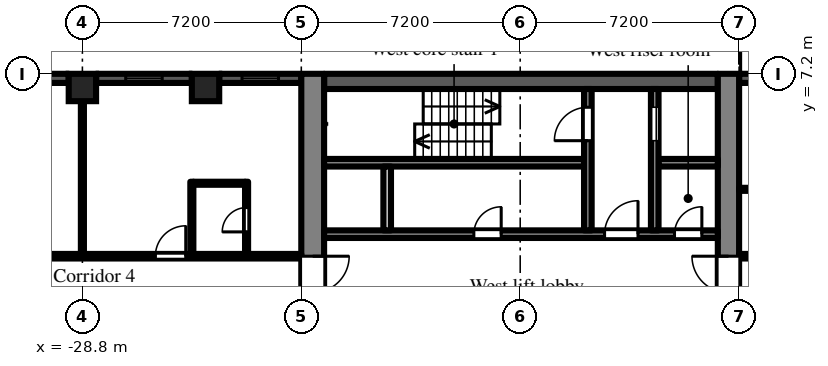
"""IFC4 building model, lengths in metres.
Left out: names, types, materials, properties, quantities, classifications, styles, units other than length and angle.
Written with IfcOpenShell. Run it as: python <this file> out.ifc"""

import sys

from ifc_helpers import new_model, si_unit, direction, frame, frame_2d, origin, origin_2d, place, context, subcontext, project, spatial, rectangle, extrude, element, fill, save


model = new_model("IFC4")
c1 = context("Model", 3, precision=1e-05, world=origin(), true_north=direction((0.0, 1.0)))
c2 = subcontext(c1, "Body", "Model", "MODEL_VIEW")
j1 = project(units=[si_unit("LENGTHUNIT", "METRE"), si_unit("PLANEANGLEUNIT", "RADIAN")], contexts=[c1])
p1 = place(None, origin())
s1 = spatial("IfcSite", under=j1, at=p1, CompositionType="ELEMENT")
p2 = place(p1, origin())
s2 = spatial("IfcBuilding", under=s1, at=p2, CompositionType="ELEMENT")
p3 = place(p2, frame((0.0, 0.0, 35.7)))
s3 = spatial("IfcBuildingStorey", under=s2, at=p3, CompositionType="ELEMENT", Elevation=35.7)
for number, where, z_axis, x_axis in (
    (1, (-28.8, 6.75, 0.0), (0.0, 0.0, 1.0), (1.0, 0.0, 0.0)),
    (2, (-24.75, 6.75, 0.0), (0.0, 0.0, 1.0), (1.0, 0.0, 0.0)),
):
    element("IfcColumn", number, at=place(p3, frame(where, z_axis=z_axis, x_axis=x_axis)), inside=s3, PredefinedType="COLUMN", context=c2, shape_type="SweptSolid", body=[
        extrude(rectangle(XDim=0.9, YDim=0.9, at=origin_2d()), origin(), (0.0, 0.0, 1.0), 3.0),
    ])
p4 = place(p3, frame((-4.2, 7.05, 0.0), z_axis=(0.0, 0.0, 1.0), x_axis=(-1.0, 0.0, 0.0)))
e3 = element("IfcWall", 3, at=p4, inside=s3, PredefinedType="SOLIDWALL", context=c2, shape_type="SweptSolid", body=[
    extrude(rectangle(XDim=3.0, YDim=0.3, at=frame_2d((1.5, 0.0))), origin(), (0.0, 0.0, 1.0), 2.1),
])
p5 = place(p3, frame((-21.6, 7.05, 0.0), z_axis=(0.0, 0.0, 1.0), x_axis=(-1.0, 0.0, 0.0)))
e4 = element("IfcWall", 4, at=p5, inside=s3, PredefinedType="SOLIDWALL", context=c2, shape_type="SweptSolid", body=[
    extrude(rectangle(XDim=2.7, YDim=0.3, at=frame_2d((1.35, 0.0))), origin(), (0.0, 0.0, 1.0), 2.1),
])
p6 = place(p5, frame((0.75, 0.0, 0.2)))
e5 = element("IfcOpeningElement", 5, at=p6, cuts=e4, PredefinedType="OPENING", context=c2, shape_type="SweptSolid", body=[
    extrude(rectangle(XDim=1.2, YDim=1.85, at=frame_2d((0.6, 0.925))), frame((0.0, 0.16, 0.0), z_axis=(0.0, -1.0, 0.0), x_axis=(1.0, 0.0, 0.0)), (0.0, 0.0, 1.0), 0.32),
])
p7 = place(p3, frame((-25.2, 7.05, 0.0), z_axis=(0.0, 0.0, 1.0), x_axis=(-1.0, 0.0, 0.0)))
e6 = element("IfcWall", 6, at=p7, inside=s3, PredefinedType="SOLIDWALL", context=c2, shape_type="SweptSolid", body=[
    extrude(rectangle(XDim=3.15, YDim=0.3, at=frame_2d((1.575, 0.0))), origin(), (0.0, 0.0, 1.0), 2.1),
])
p8 = place(p7, frame((0.975, 0.0, 0.2)))
e7 = element("IfcOpeningElement", 7, at=p8, cuts=e6, PredefinedType="OPENING", context=c2, shape_type="SweptSolid", body=[
    extrude(rectangle(XDim=1.2, YDim=1.85, at=frame_2d((0.6, 0.925))), frame((0.0, 0.16, 0.0), z_axis=(0.0, -1.0, 0.0), x_axis=(1.0, 0.0, 0.0)), (0.0, 0.0, 1.0), 0.32),
])
p9 = place(p3, frame((-29.25, 7.05, 0.0), z_axis=(0.0, 0.0, 1.0), x_axis=(-1.0, 0.0, 0.0)))
e8 = element("IfcWall", 8, at=p9, inside=s3, PredefinedType="SOLIDWALL", context=c2, shape_type="SweptSolid", body=[
    extrude(rectangle(XDim=6.3, YDim=0.3, at=frame_2d((3.15, 0.0))), origin(), (0.0, 0.0, 1.0), 2.1),
])
p10 = place(p9, frame((0.975, 0.0, 0.2)))
e9 = element("IfcOpeningElement", 9, at=p10, cuts=e8, PredefinedType="OPENING", context=c2, shape_type="SweptSolid", body=[
    extrude(rectangle(XDim=1.2, YDim=1.85, at=frame_2d((0.6, 0.925))), frame((0.0, 0.16, 0.0), z_axis=(0.0, -1.0, 0.0), x_axis=(1.0, 0.0, 0.0)), (0.0, 0.0, 1.0), 0.32),
])
p11 = place(p3, frame((-7.55, -7.2, 0.0), z_axis=(0.0, 0.0, 1.0), x_axis=(0.0, 1.0, 0.0)))
e10 = element("IfcWall", 10, at=p11, inside=s3, PredefinedType="SHEAR", context=c2, shape_type="SweptSolid", body=[
    extrude(rectangle(XDim=14.4, YDim=0.7, at=frame_2d((7.2, 0.0))), origin(), (0.0, 0.0, 1.0), 2.575),
])
p12 = place(p11, frame((6.0, 0.0, 0.0)))
e11 = element("IfcOpeningElement", 11, at=p12, cuts=e10, PredefinedType="OPENING", context=c2, shape_type="SweptSolid", body=[
    extrude(rectangle(XDim=2.4, YDim=2.2, at=frame_2d((1.2, 1.1))), frame((0.0, 0.36, 0.0), z_axis=(0.0, -1.0, 0.0), x_axis=(1.0, 0.0, 0.0)), (0.0, 0.0, 1.0), 0.72),
])
p13 = place(p3, frame((-21.225, -7.2, 0.0), z_axis=(0.0, 0.0, 1.0), x_axis=(0.0, 1.0, 0.0)))
e12 = element("IfcWall", 12, at=p13, inside=s3, PredefinedType="SHEAR", context=c2, shape_type="SweptSolid", body=[
    extrude(rectangle(XDim=14.4, YDim=0.75, at=frame_2d((7.2, 0.0))), origin(), (0.0, 0.0, 1.0), 2.575),
])
p14 = place(p13, frame((6.0, 0.0, 0.0)))
e13 = element("IfcOpeningElement", 13, at=p14, cuts=e12, PredefinedType="OPENING", context=c2, shape_type="SweptSolid", body=[
    extrude(rectangle(XDim=2.4, YDim=2.2, at=frame_2d((1.2, 1.1))), frame((0.0, 0.385, 0.0), z_axis=(0.0, -1.0, 0.0), x_axis=(1.0, 0.0, 0.0)), (0.0, 0.0, 1.0), 0.77),
])
p15 = place(p3, frame((-7.9, 6.95, 0.0), z_axis=(0.0, 0.0, 1.0), x_axis=(-1.0, 0.0, 0.0)))
e14 = element("IfcWall", 14, at=p15, inside=s3, PredefinedType="SHEAR", context=c2, shape_type="SweptSolid", body=[
    extrude(rectangle(XDim=12.95, YDim=0.5, at=frame_2d((6.475, 0.0))), origin(), (0.0, 0.0, 1.0), 2.575),
])
p16 = place(p3, frame((-7.9, 1.925, 0.0), z_axis=(0.0, 0.0, 1.0), x_axis=(-1.0, 0.0, 0.0)))
e15 = element("IfcWall", 15, at=p16, inside=s3, PredefinedType="SHEAR", context=c2, shape_type="SweptSolid", body=[
    extrude(rectangle(XDim=12.95, YDim=0.25, at=frame_2d((6.475, 0.0))), origin(), (0.0, 0.0, 1.0), 2.575),
])
p17 = place(p16, frame((0.525, 0.0, 0.0)))
e16 = element("IfcOpeningElement", 16, at=p17, cuts=e15, PredefinedType="OPENING", context=c2, shape_type="SweptSolid", body=[
    extrude(rectangle(XDim=0.9, YDim=2.1, at=frame_2d((0.45, 1.05))), frame((0.0, 0.135, 0.0), z_axis=(0.0, -1.0, 0.0), x_axis=(1.0, 0.0, 0.0)), (0.0, 0.0, 1.0), 0.27),
])
p18 = place(p16, frame((2.625, 0.0, 0.0)))
e17 = element("IfcOpeningElement", 17, at=p18, cuts=e15, PredefinedType="OPENING", context=c2, shape_type="SweptSolid", body=[
    extrude(rectangle(XDim=1.1, YDim=2.1, at=frame_2d((0.55, 1.05))), frame((0.0, 0.135, 0.0), z_axis=(0.0, -1.0, 0.0), x_axis=(1.0, 0.0, 0.0)), (0.0, 0.0, 1.0), 0.27),
])
p19 = place(p16, frame((7.125, 0.0, 0.0)))
e18 = element("IfcOpeningElement", 18, at=p19, cuts=e15, PredefinedType="OPENING", context=c2, shape_type="SweptSolid", body=[
    extrude(rectangle(XDim=0.9, YDim=2.1, at=frame_2d((0.45, 1.05))), frame((0.0, 0.135, 0.0), z_axis=(0.0, -1.0, 0.0), x_axis=(1.0, 0.0, 0.0)), (0.0, 0.0, 1.0), 0.27),
])
p20 = place(p3, frame((-7.9, 4.275, 0.0), z_axis=(0.0, 0.0, 1.0), x_axis=(-1.0, 0.0, 0.0)))
e19 = element("IfcWall", 19, at=p20, inside=s3, PredefinedType="SHEAR", context=c2, shape_type="SweptSolid", body=[
    extrude(rectangle(XDim=1.95, YDim=0.25, at=frame_2d((0.975, 0.0))), origin(), (0.0, 0.0, 1.0), 2.575),
])
p21 = place(p3, frame((-12.3, 4.275, 0.0), z_axis=(0.0, 0.0, 1.0), x_axis=(-1.0, 0.0, 0.0)))
e20 = element("IfcWall", 20, at=p21, inside=s3, PredefinedType="SHEAR", context=c2, shape_type="SweptSolid", body=[
    extrude(rectangle(XDim=8.55, YDim=0.25, at=frame_2d((4.275, 0.0))), origin(), (0.0, 0.0, 1.0), 2.575),
])
p22 = place(p3, frame((-9.975, 2.05, 0.0), z_axis=(0.0, 0.0, 1.0), x_axis=(0.0, 1.0, 0.0)))
e21 = element("IfcWall", 21, at=p22, inside=s3, PredefinedType="SHEAR", context=c2, shape_type="SweptSolid", body=[
    extrude(rectangle(XDim=4.65, YDim=0.25, at=frame_2d((2.325, 0.0))), origin(), (0.0, 0.0, 1.0), 2.575),
])
p23 = place(p22, frame((2.95, 0.0, 0.0)))
e22 = element("IfcOpeningElement", 22, at=p23, cuts=e21, PredefinedType="OPENING", context=c2, shape_type="SweptSolid", body=[
    extrude(rectangle(XDim=1.1, YDim=2.1, at=frame_2d((0.55, 1.05))), frame((0.0, 0.135, 0.0), z_axis=(0.0, -1.0, 0.0), x_axis=(1.0, 0.0, 0.0)), (0.0, 0.0, 1.0), 0.27),
])
p24 = place(p3, frame((-12.175, 2.05, 0.0), z_axis=(0.0, 0.0, 1.0), x_axis=(0.0, 1.0, 0.0)))
e23 = element("IfcWall", 23, at=p24, inside=s3, PredefinedType="SHEAR", context=c2, shape_type="SweptSolid", body=[
    extrude(rectangle(XDim=4.65, YDim=0.25, at=frame_2d((2.325, 0.0))), origin(), (0.0, 0.0, 1.0), 2.575),
])
p25 = place(p24, frame((2.95, 0.0, 0.0)))
e24 = element("IfcOpeningElement", 24, at=p25, cuts=e23, PredefinedType="OPENING", context=c2, shape_type="SweptSolid", body=[
    extrude(rectangle(XDim=1.1, YDim=2.1, at=frame_2d((0.55, 1.05))), frame((0.0, 0.135, 0.0), z_axis=(0.0, -1.0, 0.0), x_axis=(1.0, 0.0, 0.0)), (0.0, 0.0, 1.0), 0.27),
])
p26 = place(p3, frame((-18.775, 2.05, 0.0), z_axis=(0.0, 0.0, 1.0), x_axis=(0.0, 1.0, 0.0)))
e25 = element("IfcWall", 25, at=p26, inside=s3, PredefinedType="PARTITIONING", context=c2, shape_type="SweptSolid", body=[
    extrude(rectangle(XDim=2.1, YDim=0.25, at=frame_2d((1.05, 0.0))), origin(), (0.0, 0.0, 1.0), 2.575),
])
p27 = place(p3, frame((-36.5, 1.2, 0.0), z_axis=(0.0, 0.0, 1.0), x_axis=(1.0, 0.0, 0.0)))
e26 = element("IfcWall", 26, at=p27, inside=s3, PredefinedType="PARTITIONING", context=c2, shape_type="SweptSolid", body=[
    extrude(rectangle(XDim=14.9, YDim=0.15, at=frame_2d((7.45, 0.0))), origin(), (0.0, 0.0, 1.0), 2.575),
])
p28 = place(p27, frame((10.1, 0.0, 0.0)))
e27 = element("IfcOpeningElement", 27, at=p28, cuts=e26, PredefinedType="OPENING", context=c2, shape_type="SweptSolid", body=[
    extrude(rectangle(XDim=1.0, YDim=2.1, at=frame_2d((0.5, 1.05))), frame((0.0, 0.085, 0.0), z_axis=(0.0, -1.0, 0.0), x_axis=(1.0, 0.0, 0.0)), (0.0, 0.0, 1.0), 0.17),
])
p29 = place(p27, frame((5.45, 0.0, 0.0)))
e28 = element("IfcOpeningElement", 28, at=p29, cuts=e26, PredefinedType="OPENING", context=c2, shape_type="SweptSolid", body=[
    extrude(rectangle(XDim=0.9, YDim=2.1, at=frame_2d((0.45, 1.05))), frame((0.0, 0.085, 0.0), z_axis=(0.0, -1.0, 0.0), x_axis=(1.0, 0.0, 0.0)), (0.0, 0.0, 1.0), 0.17),
])
p30 = place(p27, frame((1.15, 0.0, 0.0)))
e29 = element("IfcOpeningElement", 29, at=p30, cuts=e26, PredefinedType="OPENING", context=c2, shape_type="SweptSolid", body=[
    extrude(rectangle(XDim=1.8, YDim=2.1, at=frame_2d((0.9, 1.05))), frame((0.0, 0.085, 0.0), z_axis=(0.0, -1.0, 0.0), x_axis=(1.0, 0.0, 0.0)), (0.0, 0.0, 1.0), 0.17),
])
p31 = place(p3, frame((-28.8, 1.275, 0.0), z_axis=(0.0, 0.0, 1.0), x_axis=(0.0, 1.0, 0.0)))
e30 = element("IfcWall", 30, at=p31, inside=s3, PredefinedType="PARTITIONING", context=c2, shape_type="SweptSolid", body=[
    extrude(rectangle(XDim=5.625, YDim=0.1, at=frame_2d((2.812, 0.0))), origin(), (0.0, 0.0, 1.0), 2.575),
])
p32 = place(p3, frame((-25.2, 1.275, 0.0), z_axis=(0.0, 0.0, 1.0), x_axis=(0.0, 1.0, 0.0)))
e31 = element("IfcWall", 31, at=p32, inside=s3, PredefinedType="PARTITIONING", context=c2, shape_type="SweptSolid", body=[
    extrude(rectangle(XDim=2.375, YDim=0.1, at=frame_2d((1.188, 0.0))), origin(), (0.0, 0.0, 1.0), 2.575),
])
p33 = place(p3, frame((-25.15, 3.6, 0.0), z_axis=(0.0, 0.0, 1.0), x_axis=(1.0, 0.0, 0.0)))
e32 = element("IfcWall", 32, at=p33, inside=s3, PredefinedType="PARTITIONING", context=c2, shape_type="SweptSolid", body=[
    extrude(rectangle(XDim=1.7, YDim=0.1, at=frame_2d((0.85, 0.0))), origin(), (0.0, 0.0, 1.0), 2.575),
])
p34 = place(p3, frame((-23.4, 1.275, 0.0), z_axis=(0.0, 0.0, 1.0), x_axis=(0.0, 1.0, 0.0)))
e33 = element("IfcWall", 33, at=p34, inside=s3, PredefinedType="PARTITIONING", context=c2, shape_type="SweptSolid", body=[
    extrude(rectangle(XDim=2.375, YDim=0.1, at=frame_2d((1.188, 0.0))), origin(), (0.0, 0.0, 1.0), 2.575),
])
p35 = place(p34, frame((0.725, 0.0, 0.0)))
e34 = element("IfcOpeningElement", 34, at=p35, cuts=e33, PredefinedType="OPENING", context=c2, shape_type="SweptSolid", body=[
    extrude(rectangle(XDim=0.8, YDim=2.1, at=frame_2d((0.4, 1.05))), frame((0.0, 0.06, 0.0), z_axis=(0.0, -1.0, 0.0), x_axis=(1.0, 0.0, 0.0)), (0.0, 0.0, 1.0), 0.12),
])
p36 = place(p3, frame((-7.2, 1.2, 0.0), z_axis=(0.0, 0.0, 1.0), x_axis=(1.0, 0.0, 0.0)))
e35 = element("IfcWall", 35, at=p36, inside=s3, PredefinedType="PARTITIONING", context=c2, shape_type="SweptSolid", body=[
    extrude(rectangle(XDim=6.075, YDim=0.15, at=frame_2d((3.038, 0.0))), origin(), (0.0, 0.0, 1.0), 2.575),
])
p37 = place(p36, frame((2.55, 0.0, 0.0)))
e36 = element("IfcOpeningElement", 36, at=p37, cuts=e35, PredefinedType="OPENING", context=c2, shape_type="SweptSolid", body=[
    extrude(rectangle(XDim=0.9, YDim=2.1, at=frame_2d((0.45, 1.05))), frame((0.0, 0.085, 0.0), z_axis=(0.0, -1.0, 0.0), x_axis=(1.0, 0.0, 0.0)), (0.0, 0.0, 1.0), 0.17),
])
p38 = place(p3, frame((-7.2, 3.4, 0.0), z_axis=(0.0, 0.0, 1.0), x_axis=(1.0, 0.0, 0.0)))
e37 = element("IfcWall", 37, at=p38, inside=s3, PredefinedType="PARTITIONING", context=c2, shape_type="SweptSolid", body=[
    extrude(rectangle(XDim=5.925, YDim=0.1, at=frame_2d((2.962, 0.0))), origin(), (0.0, 0.0, 1.0), 2.575),
])
p39 = place(p6, origin())
e38 = element("IfcWindow", 38, at=p39, inside=s3, PartitioningType="SINGLE_PANEL", PredefinedType="WINDOW", context=c2, shape_type="SweptSolid", body=[
    extrude(rectangle(XDim=1.2, YDim=1.85, at=frame_2d((0.6, 0.925))), frame((0.0, 0.03, 0.0), z_axis=(0.0, -1.0, 0.0), x_axis=(1.0, 0.0, 0.0)), (0.0, 0.0, 1.0), 0.06),
])
fill(e5, e38)
p40 = place(p8, origin())
e39 = element("IfcWindow", 39, at=p40, inside=s3, PartitioningType="SINGLE_PANEL", PredefinedType="WINDOW", context=c2, shape_type="SweptSolid", body=[
    extrude(rectangle(XDim=1.2, YDim=1.85, at=frame_2d((0.6, 0.925))), frame((0.0, 0.03, 0.0), z_axis=(0.0, -1.0, 0.0), x_axis=(1.0, 0.0, 0.0)), (0.0, 0.0, 1.0), 0.06),
])
fill(e7, e39)
p41 = place(p23, origin())
e40 = element("IfcDoor", 40, at=p41, inside=s3, OperationType="SLIDING_TO_LEFT", PredefinedType="DOOR", context=c2, shape_type="SweptSolid", body=[
    extrude(rectangle(XDim=1.1, YDim=2.1, at=frame_2d((0.55, 1.05))), frame((0.0, 0.025, 0.0), z_axis=(0.0, -1.0, 0.0), x_axis=(1.0, 0.0, 0.0)), (0.0, 0.0, 1.0), 0.05),
])
fill(e22, e40)
p42 = place(p25, origin())
e41 = element("IfcDoor", 41, at=p42, inside=s3, OperationType="SINGLE_SWING_LEFT", PredefinedType="DOOR", context=c2, shape_type="SweptSolid", body=[
    extrude(rectangle(XDim=1.1, YDim=2.1, at=frame_2d((0.55, 1.05))), frame((0.0, 0.025, 0.0), z_axis=(0.0, -1.0, 0.0), x_axis=(1.0, 0.0, 0.0)), (0.0, 0.0, 1.0), 0.05),
])
fill(e24, e41)
p43 = place(p17, frame((0.9, 0.0, 0.0), z_axis=(0.0, 0.0, 1.0), x_axis=(-1.0, 0.0, 0.0)))
e42 = element("IfcDoor", 42, at=p43, inside=s3, OperationType="SINGLE_SWING_RIGHT", PredefinedType="DOOR", context=c2, shape_type="SweptSolid", body=[
    extrude(rectangle(XDim=0.9, YDim=2.1, at=frame_2d((0.45, 1.05))), frame((0.0, 0.025, 0.0), z_axis=(0.0, -1.0, 0.0), x_axis=(1.0, 0.0, 0.0)), (0.0, 0.0, 1.0), 0.05),
])
fill(e16, e42)
p44 = place(p18, frame((1.1, 0.0, 0.0), z_axis=(0.0, 0.0, 1.0), x_axis=(-1.0, 0.0, 0.0)))
e43 = element("IfcDoor", 43, at=p44, inside=s3, OperationType="SINGLE_SWING_RIGHT", PredefinedType="DOOR", context=c2, shape_type="SweptSolid", body=[
    extrude(rectangle(XDim=1.1, YDim=2.1, at=frame_2d((0.55, 1.05))), frame((0.0, 0.025, 0.0), z_axis=(0.0, -1.0, 0.0), x_axis=(1.0, 0.0, 0.0)), (0.0, 0.0, 1.0), 0.05),
])
fill(e17, e43)
p45 = place(p12, origin())
e44 = element("IfcDoor", 44, at=p45, inside=s3, OperationType="DOUBLE_DOOR_DOUBLE_SWING", PredefinedType="DOOR", context=c2, shape_type="SweptSolid", body=[
    extrude(rectangle(XDim=2.4, YDim=2.2, at=frame_2d((1.2, 1.1))), frame((0.0, 0.025, 0.0), z_axis=(0.0, -1.0, 0.0), x_axis=(1.0, 0.0, 0.0)), (0.0, 0.0, 1.0), 0.05),
])
fill(e11, e44)
p46 = place(p14, frame((2.4, 0.0, 0.0), z_axis=(0.0, 0.0, 1.0), x_axis=(-1.0, 0.0, 0.0)))
e45 = element("IfcDoor", 45, at=p46, inside=s3, OperationType="DOUBLE_DOOR_DOUBLE_SWING", PredefinedType="DOOR", context=c2, shape_type="SweptSolid", body=[
    extrude(rectangle(XDim=2.4, YDim=2.2, at=frame_2d((1.2, 1.1))), frame((0.0, 0.025, 0.0), z_axis=(0.0, -1.0, 0.0), x_axis=(1.0, 0.0, 0.0)), (0.0, 0.0, 1.0), 0.05),
])
fill(e13, e45)
p47 = place(p19, frame((0.9, 0.0, 0.0), z_axis=(0.0, 0.0, 1.0), x_axis=(-1.0, 0.0, 0.0)))
e46 = element("IfcDoor", 46, at=p47, inside=s3, OperationType="SINGLE_SWING_RIGHT", PredefinedType="DOOR", context=c2, shape_type="SweptSolid", body=[
    extrude(rectangle(XDim=0.9, YDim=2.1, at=frame_2d((0.45, 1.05))), frame((0.0, 0.025, 0.0), z_axis=(0.0, -1.0, 0.0), x_axis=(1.0, 0.0, 0.0)), (0.0, 0.0, 1.0), 0.05),
])
fill(e18, e46)
p48 = place(p35, origin())
e47 = element("IfcDoor", 47, at=p48, inside=s3, OperationType="SINGLE_SWING_LEFT", PredefinedType="DOOR", context=c2, shape_type="SweptSolid", body=[
    extrude(rectangle(XDim=0.8, YDim=2.1, at=frame_2d((0.4, 1.05))), frame((0.0, 0.025, 0.0), z_axis=(0.0, -1.0, 0.0), x_axis=(1.0, 0.0, 0.0)), (0.0, 0.0, 1.0), 0.05),
])
fill(e34, e47)
p49 = place(p28, origin())
e48 = element("IfcDoor", 48, at=p49, inside=s3, OperationType="SINGLE_SWING_RIGHT", PredefinedType="DOOR", context=c2, shape_type="SweptSolid", body=[
    extrude(rectangle(XDim=1.0, YDim=2.1, at=frame_2d((0.5, 1.05))), frame((0.0, 0.025, 0.0), z_axis=(0.0, -1.0, 0.0), x_axis=(1.0, 0.0, 0.0)), (0.0, 0.0, 1.0), 0.05),
])
fill(e27, e48)
save(model, sys.argv[1])
